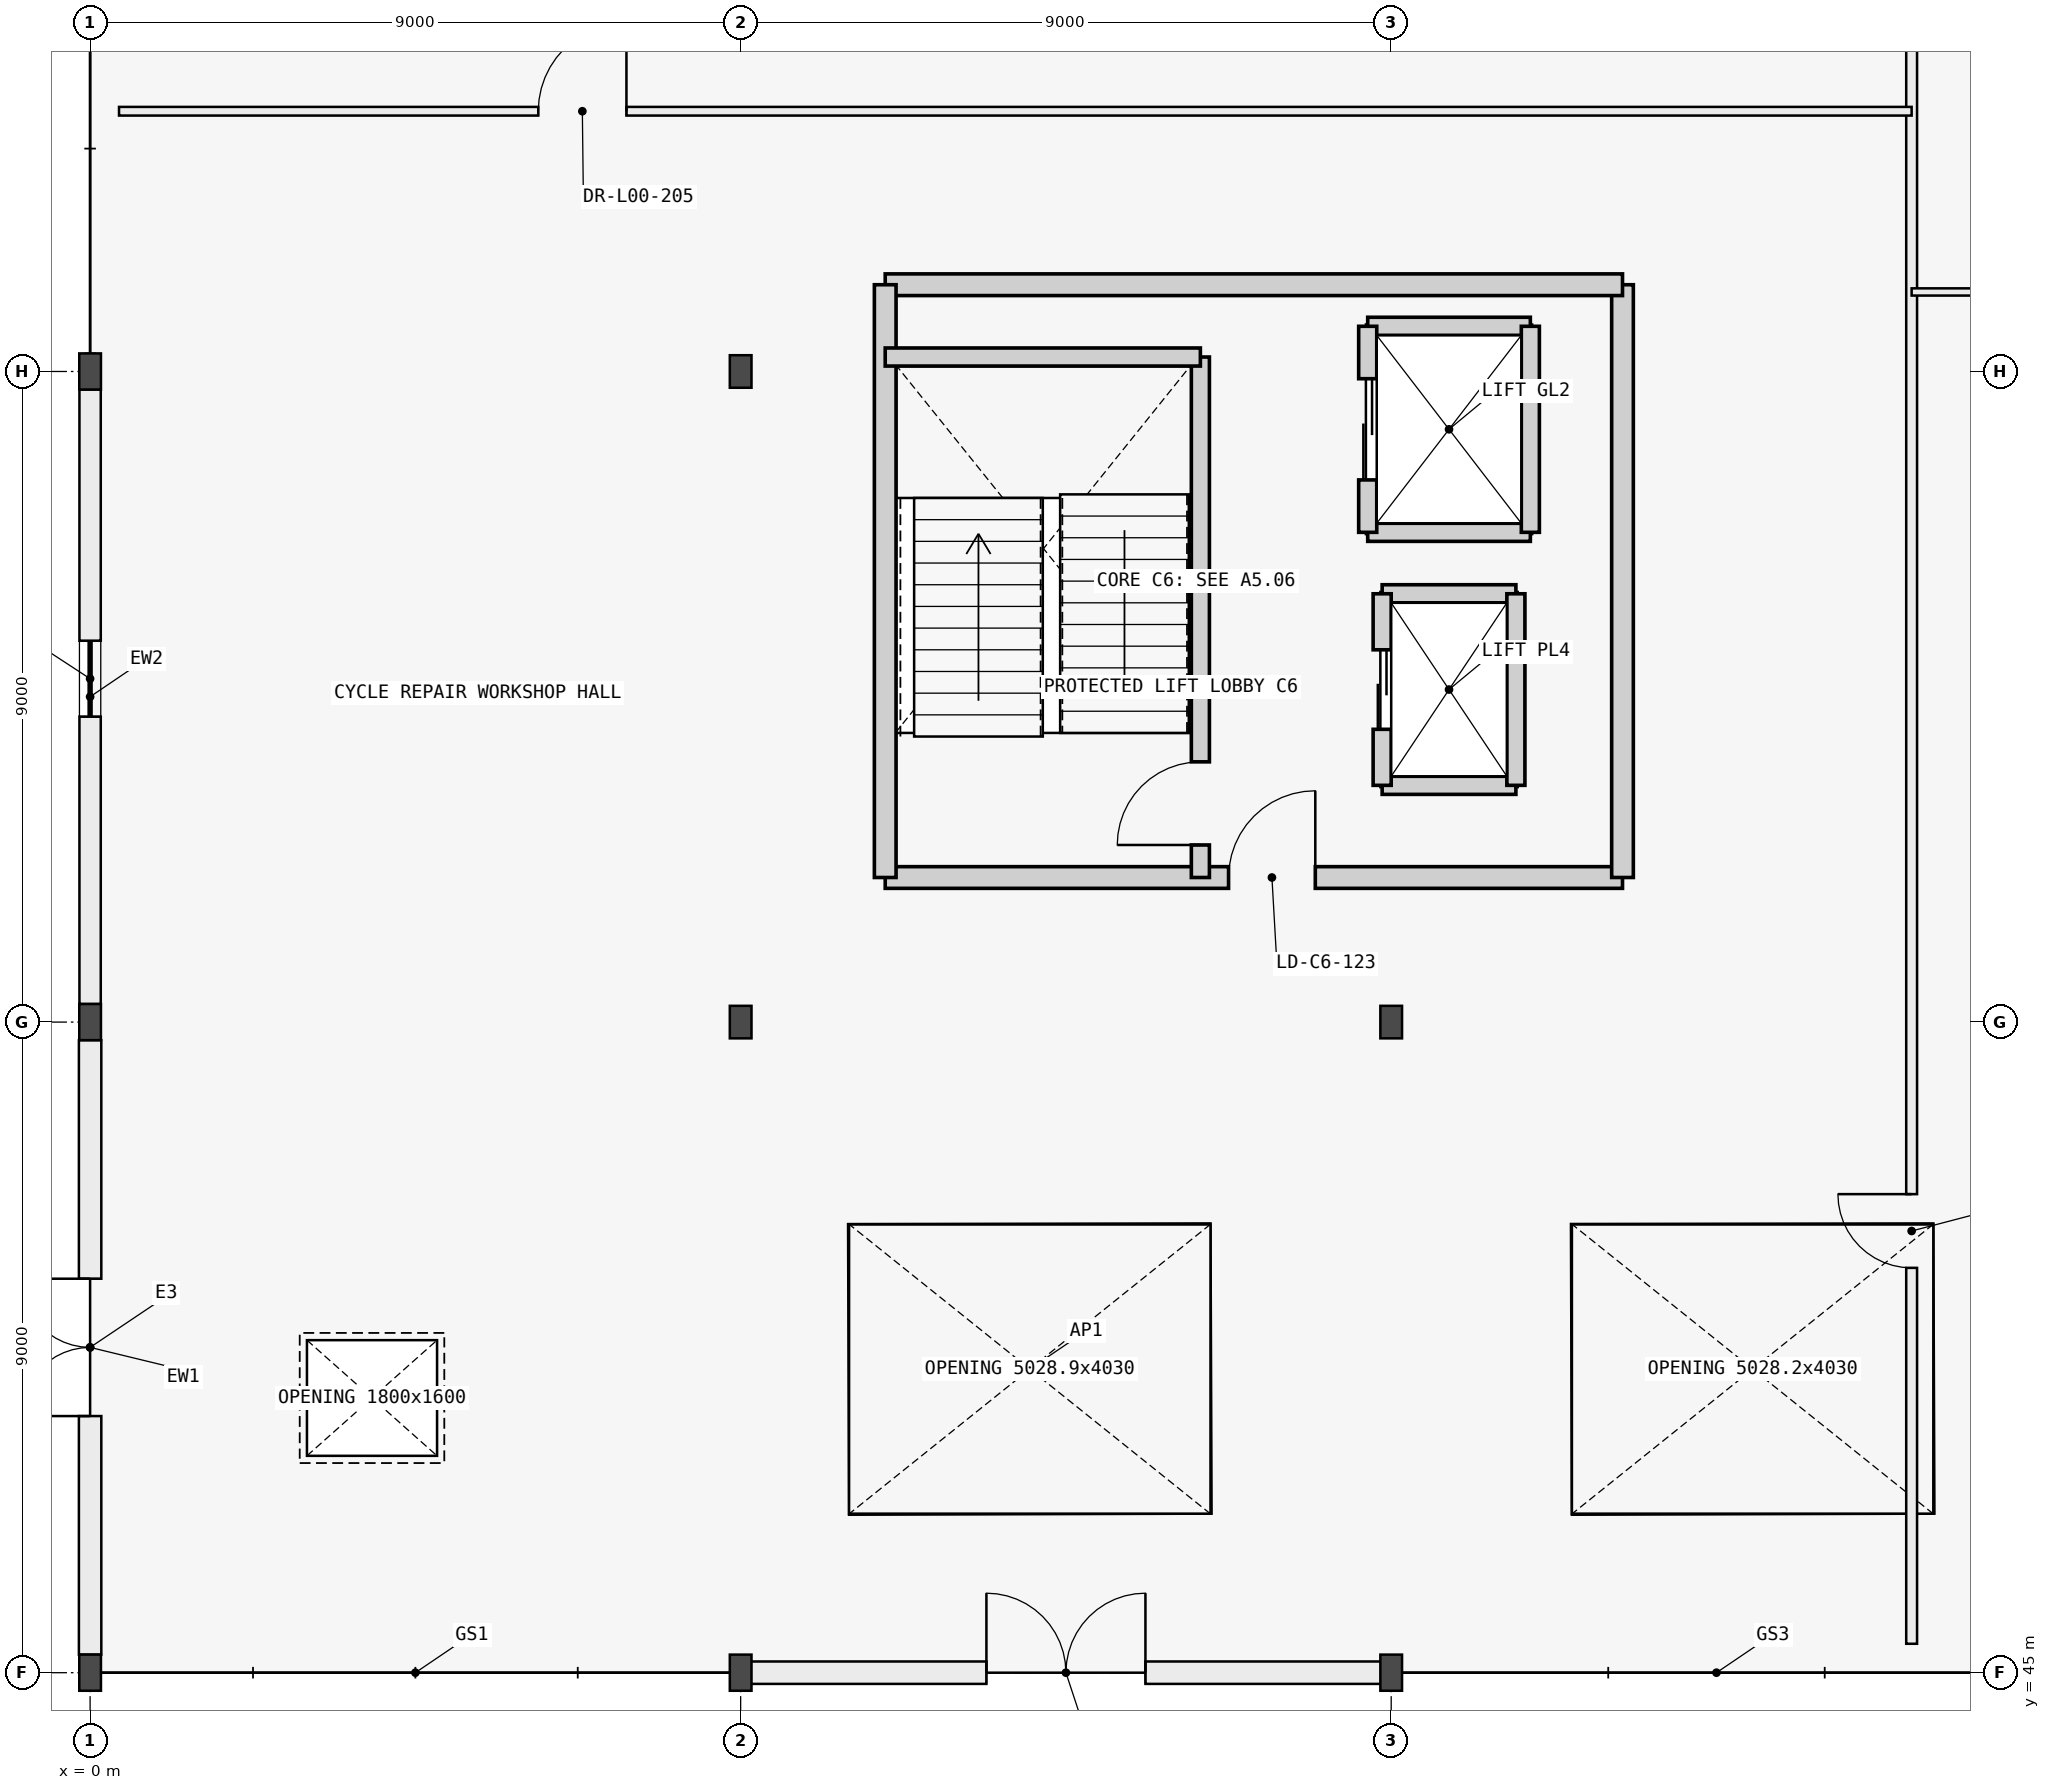
"""IFC4 building model, lengths in metres.
Left out: names, types, materials, properties, quantities, classifications, styles, units other than length and angle.
Written with IfcOpenShell. Run it as: python <this file> out.ifc"""

import sys

from ifc_helpers import new_model, si_unit, direction, frame, frame_2d, origin, origin_2d, place, context, subcontext, project, spatial, rectangle, i_section, extrude, element, fill, save


model = new_model("IFC4")
c1 = context("Model", 3, precision=1e-05, world=origin(), true_north=direction((0.0, 1.0)))
c2 = subcontext(c1, "Body", "Model", "MODEL_VIEW")
j1 = project(units=[si_unit("LENGTHUNIT", "METRE"), si_unit("PLANEANGLEUNIT", "RADIAN")], contexts=[c1])
p1 = place(None, origin())
s1 = spatial("IfcSite", under=j1, at=p1, CompositionType="ELEMENT")
p2 = place(p1, origin())
s2 = spatial("IfcBuilding", under=s1, at=p2, CompositionType="ELEMENT")
p3 = place(p2, origin())
s3 = spatial("IfcBuildingStorey", under=s2, at=p3, CompositionType="ELEMENT", Elevation=0.0)
for number, where, z_axis, x_axis in (
    (1, (0.0, 45.0, 0.0), (0.0, 0.0, 1.0), (1.0, 0.0, 0.0)),
    (2, (9.0, 45.0, 0.0), (0.0, 0.0, 1.0), (1.0, 0.0, 0.0)),
    (3, (18.0, 45.0, 0.0), (0.0, 0.0, 1.0), (1.0, 0.0, 0.0)),
    (4, (0.0, 54.0, 0.0), (0.0, 0.0, 1.0), (1.0, 0.0, 0.0)),
):
    element("IfcColumn", number, at=place(p3, frame(where, z_axis=z_axis, x_axis=x_axis)), inside=s3, PredefinedType="COLUMN", context=c2, shape_type="SweptSolid", body=[
        extrude(i_section(OverallWidth=0.3, OverallDepth=0.5, WebThickness=0.014, FlangeThickness=0.028, FilletRadius=0.027, at=origin_2d()), origin(), (0.0, 0.0, 1.0), 4.2),
    ])
for number, where, z_axis, x_axis in (
    (5, (9.0, 54.0, 0.0), (0.0, 0.0, 1.0), (1.0, 0.0, 0.0)),
    (6, (18.0, 54.0, 0.0), (0.0, 0.0, 1.0), (1.0, 0.0, 0.0)),
):
    element("IfcColumn", number, at=place(p3, frame(where, z_axis=z_axis, x_axis=x_axis)), inside=s3, PredefinedType="COLUMN", context=c2, shape_type="SweptSolid", body=[
        extrude(i_section(OverallWidth=0.3, OverallDepth=0.45, WebThickness=0.014, FlangeThickness=0.026, FilletRadius=0.027, at=origin_2d()), origin(), (0.0, 0.0, 1.0), 4.2),
    ])
p4 = place(p3, frame((0.0, 63.0, 0.0), z_axis=(0.0, 0.0, 1.0), x_axis=(1.0, 0.0, 0.0)))
e7 = element("IfcColumn", 7, at=p4, inside=s3, PredefinedType="COLUMN", context=c2, shape_type="SweptSolid", body=[
    extrude(i_section(OverallWidth=0.3, OverallDepth=0.5, WebThickness=0.014, FlangeThickness=0.028, FilletRadius=0.027, at=origin_2d()), origin(), (0.0, 0.0, 1.0), 4.2),
])
p5 = place(p3, frame((9.0, 63.0, 0.0), z_axis=(0.0, 0.0, 1.0), x_axis=(1.0, 0.0, 0.0)))
e8 = element("IfcColumn", 8, at=p5, inside=s3, PredefinedType="COLUMN", context=c2, shape_type="SweptSolid", body=[
    extrude(i_section(OverallWidth=0.3, OverallDepth=0.45, WebThickness=0.014, FlangeThickness=0.026, FilletRadius=0.027, at=origin_2d()), origin(), (0.0, 0.0, 1.0), 4.2),
])
p6 = place(p3, frame((0.0, 45.25, 0.0), z_axis=(0.0, 0.0, 1.0), x_axis=(0.0, 1.0, 0.0)))
e9 = element("IfcWall", 9, at=p6, inside=s3, PredefinedType="STANDARD", context=c2, shape_type="SweptSolid", body=[
    extrude(rectangle(XDim=8.5, YDim=0.31, at=frame_2d((4.25, 0.0))), origin(), (0.0, 0.0, 1.0), 3.625),
])
p7 = place(p6, frame((3.3, 0.0, 0.0)))
e10 = element("IfcOpeningElement", 10, at=p7, cuts=e9, PredefinedType="OPENING", context=c2, shape_type="SweptSolid", body=[
    extrude(rectangle(XDim=1.9, YDim=2.25, at=frame_2d((0.95, 1.125))), frame((0.0, 0.165, 0.0), z_axis=(0.0, -1.0, 0.0), x_axis=(1.0, 0.0, 0.0)), (0.0, 0.0, 1.0), 0.33),
])
p8 = place(p3, frame((0.0, 54.25, 0.0), z_axis=(0.0, 0.0, 1.0), x_axis=(0.0, 1.0, 0.0)))
e11 = element("IfcWall", 11, at=p8, inside=s3, PredefinedType="STANDARD", context=c2, shape_type="SweptSolid", body=[
    extrude(rectangle(XDim=8.5, YDim=0.295, at=frame_2d((4.25, 0.0))), origin(), (0.0, 0.0, 1.0), 3.625),
])
p9 = place(p8, frame((3.975, 0.0, 0.95)))
e12 = element("IfcOpeningElement", 12, at=p9, cuts=e11, PredefinedType="OPENING", context=c2, shape_type="SweptSolid", body=[
    extrude(rectangle(XDim=1.05, YDim=1.25, at=frame_2d((0.525, 0.625))), frame((0.0, 0.157, 0.0), z_axis=(0.0, -1.0, 0.0), x_axis=(1.0, 0.0, 0.0)), (0.0, 0.0, 1.0), 0.315),
])
p10 = place(p3, frame((9.007, 45.0, 0.0), z_axis=(0.0, 0.0, 1.0), x_axis=(1.0, 0.0, 0.0)))
e13 = element("IfcWall", 13, at=p10, inside=s3, PredefinedType="STANDARD", context=c2, shape_type="SweptSolid", body=[
    extrude(rectangle(XDim=8.986, YDim=0.31, at=frame_2d((4.493, 0.0))), origin(), (0.0, 0.0, 1.0), 3.625),
])
p11 = place(p10, frame((3.393, 0.0, 0.0)))
e14 = element("IfcOpeningElement", 14, at=p11, cuts=e13, PredefinedType="OPENING", context=c2, shape_type="SweptSolid", body=[
    extrude(rectangle(XDim=2.2, YDim=2.4, at=frame_2d((1.1, 1.2))), frame((0.0, 0.165, 0.0), z_axis=(0.0, -1.0, 0.0), x_axis=(1.0, 0.0, 0.0)), (0.0, 0.0, 1.0), 0.33),
])
p12 = place(p3, frame((11.0, 56.0, 0.0), z_axis=(0.0, 0.0, 1.0), x_axis=(1.0, 0.0, 0.0)))
e15 = element("IfcWall", 15, at=p12, inside=s3, PredefinedType="SHEAR", context=c2, shape_type="SweptSolid", body=[
    extrude(rectangle(XDim=10.2, YDim=0.3, at=frame_2d((5.1, 0.0))), origin(), (0.0, 0.0, 1.0), 3.95),
])
p13 = place(p12, frame((4.75, 0.0, 0.0)))
e16 = element("IfcOpeningElement", 16, at=p13, cuts=e15, PredefinedType="OPENING", context=c2, shape_type="SweptSolid", body=[
    extrude(rectangle(XDim=1.2, YDim=2.15, at=frame_2d((0.6, 1.075))), frame((0.0, 0.16, 0.0), z_axis=(0.0, -1.0, 0.0), x_axis=(1.0, 0.0, 0.0)), (0.0, 0.0, 1.0), 0.32),
])
p14 = place(p3, frame((21.2, 56.0, 0.0), z_axis=(0.0, 0.0, 1.0), x_axis=(0.0, 1.0, 0.0)))
e17 = element("IfcWall", 17, at=p14, inside=s3, PredefinedType="SHEAR", context=c2, shape_type="SweptSolid", body=[
    extrude(rectangle(XDim=8.2, YDim=0.3, at=frame_2d((4.1, 0.0))), origin(), (0.0, 0.0, 1.0), 3.95),
])
p15 = place(p3, frame((21.2, 64.2, 0.0), z_axis=(0.0, 0.0, 1.0), x_axis=(-1.0, 0.0, 0.0)))
e18 = element("IfcWall", 18, at=p15, inside=s3, PredefinedType="SHEAR", context=c2, shape_type="SweptSolid", body=[
    extrude(rectangle(XDim=10.2, YDim=0.3, at=frame_2d((5.1, 0.0))), origin(), (0.0, 0.0, 1.0), 3.95),
])
p16 = place(p3, frame((11.0, 64.2, 0.0), z_axis=(0.0, 0.0, 1.0), x_axis=(0.0, -1.0, 0.0)))
e19 = element("IfcWall", 19, at=p16, inside=s3, PredefinedType="SHEAR", context=c2, shape_type="SweptSolid", body=[
    extrude(rectangle(XDim=8.2, YDim=0.3, at=frame_2d((4.1, 0.0))), origin(), (0.0, 0.0, 1.0), 3.95),
])
p17 = place(p3, frame((15.36, 56.0, 0.0), z_axis=(0.0, 0.0, 1.0), x_axis=(0.0, 1.0, 0.0)))
e20 = element("IfcWall", 20, at=p17, inside=s3, PredefinedType="SHEAR", context=c2, shape_type="SweptSolid", body=[
    extrude(rectangle(XDim=7.2, YDim=0.25, at=frame_2d((3.6, 0.0))), origin(), (0.0, 0.0, 1.0), 3.95),
])
p18 = place(p17, frame((0.45, 0.0, 0.0)))
e21 = element("IfcOpeningElement", 21, at=p18, cuts=e20, PredefinedType="OPENING", context=c2, shape_type="SweptSolid", body=[
    extrude(rectangle(XDim=1.15, YDim=2.15, at=frame_2d((0.575, 1.075))), frame((0.0, 0.135, 0.0), z_axis=(0.0, -1.0, 0.0), x_axis=(1.0, 0.0, 0.0)), (0.0, 0.0, 1.0), 0.27),
])
p19 = place(p3, frame((11.0, 63.2, 0.0), z_axis=(0.0, 0.0, 1.0), x_axis=(1.0, 0.0, 0.0)))
e22 = element("IfcWall", 22, at=p19, inside=s3, PredefinedType="SHEAR", context=c2, shape_type="SweptSolid", body=[
    extrude(rectangle(XDim=4.36, YDim=0.25, at=frame_2d((2.18, 0.0))), origin(), (0.0, 0.0, 1.0), 3.95),
])
for number, where, z_axis, x_axis in (
    (23, (17.875, 57.275, 0.0), (0.0, 0.0, 1.0), (1.0, 0.0, 0.0)),
    (24, (17.875, 59.925, 0.0), (0.0, 0.0, 1.0), (1.0, 0.0, 0.0)),
):
    element("IfcWall", number, at=place(p3, frame(where, z_axis=z_axis, x_axis=x_axis)), inside=s3, PredefinedType="SHEAR", context=c2, shape_type="SweptSolid", body=[
        extrude(rectangle(XDim=1.85, YDim=0.25, at=frame_2d((0.925, 0.0))), origin(), (0.0, 0.0, 1.0), 3.95),
    ])
p20 = place(p3, frame((19.725, 57.275, 0.0), z_axis=(0.0, 0.0, 1.0), x_axis=(0.0, 1.0, 0.0)))
e25 = element("IfcWall", 25, at=p20, inside=s3, PredefinedType="SHEAR", context=c2, shape_type="SweptSolid", body=[
    extrude(rectangle(XDim=2.65, YDim=0.25, at=frame_2d((1.325, 0.0))), origin(), (0.0, 0.0, 1.0), 3.95),
])
p21 = place(p3, frame((17.875, 57.275, 0.0), z_axis=(0.0, 0.0, 1.0), x_axis=(0.0, 1.0, 0.0)))
e26 = element("IfcWall", 26, at=p21, inside=s3, PredefinedType="SHEAR", context=c2, shape_type="SweptSolid", body=[
    extrude(rectangle(XDim=2.65, YDim=0.25, at=frame_2d((1.325, 0.0))), origin(), (0.0, 0.0, 1.0), 3.95),
])
p22 = place(p21, frame((0.775, 0.0, 0.0)))
e27 = element("IfcOpeningElement", 27, at=p22, cuts=e26, PredefinedType="OPENING", context=c2, shape_type="SweptSolid", body=[
    extrude(rectangle(XDim=1.1, YDim=2.15, at=frame_2d((0.55, 1.075))), frame((0.0, 0.135, 0.0), z_axis=(0.0, -1.0, 0.0), x_axis=(1.0, 0.0, 0.0)), (0.0, 0.0, 1.0), 0.27),
])
for number, where, z_axis, x_axis in (
    (28, (17.675, 60.775, 0.0), (0.0, 0.0, 1.0), (1.0, 0.0, 0.0)),
    (29, (17.675, 63.625, 0.0), (0.0, 0.0, 1.0), (1.0, 0.0, 0.0)),
):
    element("IfcWall", number, at=place(p3, frame(where, z_axis=z_axis, x_axis=x_axis)), inside=s3, PredefinedType="SHEAR", context=c2, shape_type="SweptSolid", body=[
        extrude(rectangle(XDim=2.25, YDim=0.25, at=frame_2d((1.125, 0.0))), origin(), (0.0, 0.0, 1.0), 3.95),
    ])
p23 = place(p3, frame((19.925, 60.775, 0.0), z_axis=(0.0, 0.0, 1.0), x_axis=(0.0, 1.0, 0.0)))
e30 = element("IfcWall", 30, at=p23, inside=s3, PredefinedType="SHEAR", context=c2, shape_type="SweptSolid", body=[
    extrude(rectangle(XDim=2.85, YDim=0.25, at=frame_2d((1.425, 0.0))), origin(), (0.0, 0.0, 1.0), 3.95),
])
p24 = place(p3, frame((17.675, 60.775, 0.0), z_axis=(0.0, 0.0, 1.0), x_axis=(0.0, 1.0, 0.0)))
e31 = element("IfcWall", 31, at=p24, inside=s3, PredefinedType="SHEAR", context=c2, shape_type="SweptSolid", body=[
    extrude(rectangle(XDim=2.85, YDim=0.25, at=frame_2d((1.425, 0.0))), origin(), (0.0, 0.0, 1.0), 3.95),
])
p25 = place(p24, frame((0.725, 0.0, 0.0)))
e32 = element("IfcOpeningElement", 32, at=p25, cuts=e31, PredefinedType="OPENING", context=c2, shape_type="SweptSolid", body=[
    extrude(rectangle(XDim=1.4, YDim=2.2, at=frame_2d((0.7, 1.1))), frame((0.0, 0.135, 0.0), z_axis=(0.0, -1.0, 0.0), x_axis=(1.0, 0.0, 0.0)), (0.0, 0.0, 1.0), 0.27),
])
p26 = place(p3, frame((25.2, 45.4, 0.0), z_axis=(0.0, 0.0, 1.0), x_axis=(0.0, 1.0, 0.0)))
e33 = element("IfcWall", 33, at=p26, inside=s3, PredefinedType="PARTITIONING", context=c2, shape_type="SweptSolid", body=[
    extrude(rectangle(XDim=35.2, YDim=0.15, at=frame_2d((17.6, 0.0))), origin(), (0.0, 0.0, 1.0), 3.95),
])
p27 = place(p26, frame((5.2, 0.0, 0.0)))
e34 = element("IfcOpeningElement", 34, at=p27, cuts=e33, PredefinedType="OPENING", context=c2, shape_type="SweptSolid", body=[
    extrude(rectangle(XDim=1.02, YDim=2.12, at=frame_2d((0.51, 1.06))), frame((0.0, 0.085, 0.0), z_axis=(0.0, -1.0, 0.0), x_axis=(1.0, 0.0, 0.0)), (0.0, 0.0, 1.0), 0.17),
])
p28 = place(p26, frame((24.5, 0.0, 0.0)))
e35 = element("IfcOpeningElement", 35, at=p28, cuts=e33, PredefinedType="OPENING", context=c2, shape_type="SweptSolid", body=[
    extrude(rectangle(XDim=1.12, YDim=2.15, at=frame_2d((0.56, 1.075))), frame((0.0, 0.085, 0.0), z_axis=(0.0, -1.0, 0.0), x_axis=(1.0, 0.0, 0.0)), (0.0, 0.0, 1.0), 0.17),
])
p29 = place(p3, frame((0.4, 66.6, 0.0), z_axis=(0.0, 0.0, 1.0), x_axis=(1.0, 0.0, 0.0)))
e36 = element("IfcWall", 36, at=p29, inside=s3, PredefinedType="PARTITIONING", context=c2, shape_type="SweptSolid", body=[
    extrude(rectangle(XDim=24.8, YDim=0.12, at=frame_2d((12.4, 0.0))), origin(), (0.0, 0.0, 1.0), 3.95),
])
p30 = place(p29, frame((5.8, 0.0, 0.0)))
e37 = element("IfcOpeningElement", 37, at=p30, cuts=e36, PredefinedType="OPENING", context=c2, shape_type="SweptSolid", body=[
    extrude(rectangle(XDim=1.22, YDim=2.18, at=frame_2d((0.61, 1.09))), frame((0.0, 0.07, 0.0), z_axis=(0.0, -1.0, 0.0), x_axis=(1.0, 0.0, 0.0)), (0.0, 0.0, 1.0), 0.14),
])
p31 = place(p3, frame((25.2, 64.1, 0.0), z_axis=(0.0, 0.0, 1.0), x_axis=(1.0, 0.0, 0.0)))
e38 = element("IfcWall", 38, at=p31, inside=s3, PredefinedType="PARTITIONING", context=c2, shape_type="SweptSolid", body=[
    extrude(rectangle(XDim=24.275, YDim=0.1, at=frame_2d((12.138, 0.0))), origin(), (0.0, 0.0, 1.0), 3.95),
])
p32 = place(p31, frame((6.5, 0.0, 0.0)))
e39 = element("IfcOpeningElement", 39, at=p32, cuts=e38, PredefinedType="OPENING", context=c2, shape_type="SweptSolid", body=[
    extrude(rectangle(XDim=1.32, YDim=2.2, at=frame_2d((0.66, 1.1))), frame((0.0, 0.06, 0.0), z_axis=(0.0, -1.0, 0.0), x_axis=(1.0, 0.0, 0.0)), (0.0, 0.0, 1.0), 0.12),
])
p33 = place(p7, origin())
e40 = element("IfcDoor", 40, at=p33, inside=s3, OperationType="DOUBLE_DOOR_SINGLE_SWING", PredefinedType="DOOR", context=c2, shape_type="SweptSolid", body=[
    extrude(rectangle(XDim=1.9, YDim=2.25, at=frame_2d((0.95, 1.125))), frame((0.0, 0.025, 0.0), z_axis=(0.0, -1.0, 0.0), x_axis=(1.0, 0.0, 0.0)), (0.0, 0.0, 1.0), 0.05),
])
fill(e10, e40)
p34 = place(p9, origin())
e41 = element("IfcWindow", 41, at=p34, inside=s3, PartitioningType="SINGLE_PANEL", PredefinedType="WINDOW", context=c2, shape_type="SweptSolid", body=[
    extrude(rectangle(XDim=1.05, YDim=1.25, at=frame_2d((0.525, 0.625))), frame((0.0, 0.03, 0.0), z_axis=(0.0, -1.0, 0.0), x_axis=(1.0, 0.0, 0.0)), (0.0, 0.0, 1.0), 0.06),
])
fill(e12, e41)
p35 = place(p11, frame((2.2, 0.0, 0.0), z_axis=(0.0, 0.0, 1.0), x_axis=(-1.0, 0.0, 0.0)))
e42 = element("IfcDoor", 42, at=p35, inside=s3, OperationType="DOUBLE_DOOR_SINGLE_SWING", PredefinedType="DOOR", context=c2, shape_type="SweptSolid", body=[
    extrude(rectangle(XDim=2.2, YDim=2.4, at=frame_2d((1.1, 1.2))), frame((0.0, 0.025, 0.0), z_axis=(0.0, -1.0, 0.0), x_axis=(1.0, 0.0, 0.0)), (0.0, 0.0, 1.0), 0.05),
])
fill(e14, e42)
p36 = place(p18, origin())
e43 = element("IfcDoor", 43, at=p36, inside=s3, OperationType="SINGLE_SWING_LEFT", PredefinedType="DOOR", context=c2, shape_type="SweptSolid", body=[
    extrude(rectangle(XDim=1.15, YDim=2.15, at=frame_2d((0.575, 1.075))), frame((0.0, 0.025, 0.0), z_axis=(0.0, -1.0, 0.0), x_axis=(1.0, 0.0, 0.0)), (0.0, 0.0, 1.0), 0.05),
])
fill(e21, e43)
p37 = place(p13, origin())
e44 = element("IfcDoor", 44, at=p37, inside=s3, OperationType="SINGLE_SWING_RIGHT", PredefinedType="DOOR", context=c2, shape_type="SweptSolid", body=[
    extrude(rectangle(XDim=1.2, YDim=2.15, at=frame_2d((0.6, 1.075))), frame((0.0, 0.025, 0.0), z_axis=(0.0, -1.0, 0.0), x_axis=(1.0, 0.0, 0.0)), (0.0, 0.0, 1.0), 0.05),
])
fill(e16, e44)
p38 = place(p22, origin())
e45 = element("IfcDoor", 45, at=p38, inside=s3, OperationType="DOUBLE_DOOR_SLIDING", PredefinedType="USERDEFINED", context=c2, shape_type="SweptSolid", body=[
    extrude(rectangle(XDim=1.1, YDim=2.15, at=frame_2d((0.55, 1.075))), frame((0.0, 0.025, 0.0), z_axis=(0.0, -1.0, 0.0), x_axis=(1.0, 0.0, 0.0)), (0.0, 0.0, 1.0), 0.05),
])
fill(e27, e45)
p39 = place(p25, origin())
e46 = element("IfcDoor", 46, at=p39, inside=s3, OperationType="DOUBLE_DOOR_SLIDING", PredefinedType="USERDEFINED", context=c2, shape_type="SweptSolid", body=[
    extrude(rectangle(XDim=1.4, YDim=2.2, at=frame_2d((0.7, 1.1))), frame((0.0, 0.025, 0.0), z_axis=(0.0, -1.0, 0.0), x_axis=(1.0, 0.0, 0.0)), (0.0, 0.0, 1.0), 0.05),
])
fill(e32, e46)
p40 = place(p27, origin())
e47 = element("IfcDoor", 47, at=p40, inside=s3, OperationType="SINGLE_SWING_RIGHT", PredefinedType="DOOR", context=c2, shape_type="SweptSolid", body=[
    extrude(rectangle(XDim=1.02, YDim=2.12, at=frame_2d((0.51, 1.06))), frame((0.0, 0.025, 0.0), z_axis=(0.0, -1.0, 0.0), x_axis=(1.0, 0.0, 0.0)), (0.0, 0.0, 1.0), 0.05),
])
fill(e34, e47)
p41 = place(p30, origin())
e48 = element("IfcDoor", 48, at=p41, inside=s3, OperationType="SINGLE_SWING_RIGHT", PredefinedType="DOOR", context=c2, shape_type="SweptSolid", body=[
    extrude(rectangle(XDim=1.22, YDim=2.18, at=frame_2d((0.61, 1.09))), frame((0.0, 0.025, 0.0), z_axis=(0.0, -1.0, 0.0), x_axis=(1.0, 0.0, 0.0)), (0.0, 0.0, 1.0), 0.05),
])
fill(e37, e48)
save(model, sys.argv[1])
